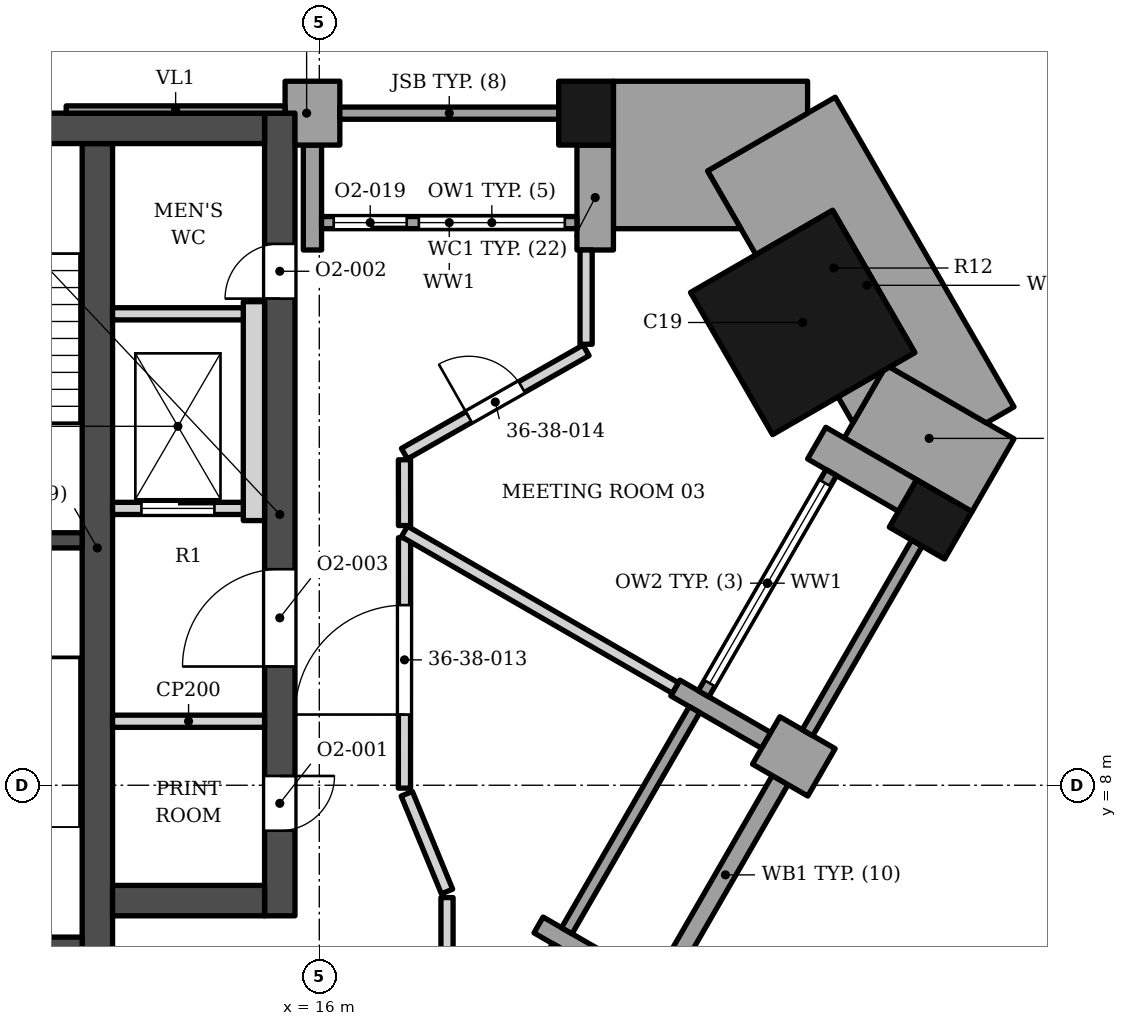
"""IFC4 building model, lengths in metres.
Left out: names, types, materials, properties, quantities, classifications, styles, units other than length and angle.
Written with IfcOpenShell. Run it as: python <this file> out.ifc"""

import sys

from ifc_helpers import new_model, si_unit, direction, frame, frame_2d, origin, origin_2d, place, context, subcontext, project, spatial, polyline, rectangle, outline, extrude, element, fill, save


model = new_model("IFC4")
c1 = context("Model", 3, precision=1e-05, world=origin(), true_north=direction((0.0, 1.0)))
c2 = subcontext(c1, "Body", "Model", "MODEL_VIEW")
j1 = project(units=[si_unit("LENGTHUNIT", "METRE"), si_unit("PLANEANGLEUNIT", "RADIAN")], contexts=[c1])
p1 = place(None, origin())
s1 = spatial("IfcSite", under=j1, at=p1, CompositionType="ELEMENT")
p2 = place(p1, origin())
s2 = spatial("IfcBuilding", under=s1, at=p2, CompositionType="ELEMENT")
p3 = place(p2, frame((0.0, 0.0, 156.3)))
s3 = spatial("IfcBuildingStorey", under=s2, at=p3, CompositionType="ELEMENT", Elevation=156.3)
p4 = place(p3, frame((-15.1, 18.802, 0.0), z_axis=(0.0, 0.0, 1.0), x_axis=(1.0, 0.0, 0.0)))
e1 = element("IfcWall", 1, at=p4, inside=s3, PredefinedType="SHEAR", context=c2, shape_type="SweptSolid", body=[
    extrude(rectangle(XDim=30.2, YDim=0.5, at=frame_2d((15.1, 0.0))), origin(), (0.0, 0.0, 1.0), 3.9),
])
p5 = place(p3, frame((12.35, 5.253, 0.0), z_axis=(0.0, 0.0, 1.0), x_axis=(0.0, 1.0, 0.0)))
e2 = element("IfcWall", 2, at=p5, inside=s3, PredefinedType="SHEAR", context=c2, shape_type="SweptSolid", body=[
    extrude(rectangle(XDim=13.3, YDim=0.5, at=frame_2d((6.65, 0.0))), origin(), (0.0, 0.0, 1.0), 3.9),
])
for number, where, z_axis, x_axis in (
    (3, (8.35, 12.028, 0.0), (0.0, 0.0, 1.0), (1.0, 0.0, 0.0)),
    (4, (8.35, 5.378, 0.0), (0.0, 0.0, 1.0), (1.0, 0.0, 0.0)),
):
    element("IfcWall", number, at=place(p3, frame(where, z_axis=z_axis, x_axis=x_axis)), inside=s3, PredefinedType="SHEAR", context=c2, shape_type="SweptSolid", body=[
        extrude(rectangle(XDim=3.75, YDim=0.25, at=frame_2d((1.875, 0.0))), origin(), (0.0, 0.0, 1.0), 3.9),
    ])
p6 = place(p3, frame((12.6, 6.103, 0.0), z_axis=(0.0, 0.0, 1.0), x_axis=(1.0, 0.0, 0.0)))
e5 = element("IfcWall", 5, at=p6, inside=s3, PredefinedType="SHEAR", context=c2, shape_type="SweptSolid", body=[
    extrude(rectangle(XDim=2.5, YDim=0.5, at=frame_2d((1.25, 0.0))), origin(), (0.0, 0.0, 1.0), 3.9),
])
p7 = place(p3, frame((15.35, 5.853, 0.0), z_axis=(0.0, 0.0, 1.0), x_axis=(0.0, 1.0, 0.0)))
e6 = element("IfcWall", 6, at=p7, inside=s3, PredefinedType="SHEAR", context=c2, shape_type="SweptSolid", body=[
    extrude(rectangle(XDim=13.2, YDim=0.5, at=frame_2d((6.6, 0.0))), origin(), (0.0, 0.0, 1.0), 3.9),
])
p8 = place(p7, frame((4.1, 0.0, 0.0)))
e7 = element("IfcOpeningElement", 7, at=p8, cuts=e6, PredefinedType="OPENING", context=c2, shape_type="SweptSolid", body=[
    extrude(rectangle(XDim=1.6, YDim=2.1, at=frame_2d((0.8, 1.05))), frame((0.0, 0.26, 0.0), z_axis=(0.0, -1.0, 0.0), x_axis=(1.0, 0.0, 0.0)), (0.0, 0.0, 1.0), 0.52),
])
p9 = place(p7, frame((1.4, 0.0, 0.0)))
e8 = element("IfcOpeningElement", 8, at=p9, cuts=e6, PredefinedType="OPENING", context=c2, shape_type="SweptSolid", body=[
    extrude(rectangle(XDim=0.9, YDim=2.1, at=frame_2d((0.45, 1.05))), frame((0.0, 0.26, 0.0), z_axis=(0.0, -1.0, 0.0), x_axis=(1.0, 0.0, 0.0)), (0.0, 0.0, 1.0), 0.52),
])
p10 = place(p7, frame((10.15, 0.0, 0.0)))
e9 = element("IfcOpeningElement", 9, at=p10, cuts=e6, PredefinedType="OPENING", context=c2, shape_type="SweptSolid", body=[
    extrude(rectangle(XDim=0.9, YDim=2.1, at=frame_2d((0.45, 1.05))), frame((0.0, 0.26, 0.0), z_axis=(0.0, -1.0, 0.0), x_axis=(1.0, 0.0, 0.0)), (0.0, 0.0, 1.0), 0.52),
])
p11 = place(p3, frame((23.949, 15.61, 0.0), z_axis=(0.0, 0.0, 1.0), x_axis=(-0.866025386331, -0.50000003023, 0.0)))
e10 = element("IfcColumn", 10, at=p11, inside=s3, PredefinedType="COLUMN", context=c2, shape_type="SweptSolid", body=[
    extrude(rectangle(XDim=2.7, YDim=2.7, at=origin_2d()), origin(), (0.0, 0.0, 1.0), 3.9),
])
for number, where, z_axis, x_axis in (
    (11, (26.054, 12.372, 0.0), (0.0, 0.0, 1.0), (0.5, 0.866, 0.0)),
    (12, (20.387, 19.053, 0.0), (0.0, 0.0, 1.0), (-1.0, 0.0, 0.0)),
):
    element("IfcColumn", number, at=place(p3, frame(where, z_axis=z_axis, x_axis=x_axis)), inside=s3, PredefinedType="COLUMN", context=c2, shape_type="SweptSolid", body=[
        extrude(rectangle(XDim=0.9, YDim=1.05, at=origin_2d()), origin(), (0.0, 0.0, 1.0), 3.9),
    ])
p12 = place(p3, frame((21.1, 4.84, 0.0), z_axis=(0.0, 0.0, 1.0), x_axis=(-0.866013532718, 0.500020560727, 0.0)))
e13 = element("IfcWall", 13, at=p12, inside=s3, PredefinedType="SOLIDWALL", context=c2, shape_type="SweptSolid", body=[
    extrude(rectangle(XDim=1.725, YDim=0.3, at=frame_2d((0.863, 0.0))), origin(), (0.0, 0.0, 1.0), 2.95),
])
p13 = place(p3, frame((24.259, 8.212, 0.0), z_axis=(0.0, 0.0, 1.0), x_axis=(-0.86592997719, 0.500165247297, 0.0)))
e14 = element("IfcWall", 14, at=p13, inside=s3, PredefinedType="SOLIDWALL", context=c2, shape_type="SweptSolid", body=[
    extrude(rectangle(XDim=1.05, YDim=0.9, at=frame_2d((0.525, 0.0))), origin(), (0.0, 0.0, 1.0), 3.0),
])
p14 = place(p3, frame((23.35, 8.737, 0.0), z_axis=(0.0, 0.0, 1.0), x_axis=(-0.866013532718, 0.500020560727, 0.0)))
e15 = element("IfcWall", 15, at=p14, inside=s3, PredefinedType="SOLIDWALL", context=c2, shape_type="SweptSolid", body=[
    extrude(rectangle(XDim=1.725, YDim=0.3, at=frame_2d((0.863, 0.0))), origin(), (0.0, 0.0, 1.0), 3.0),
])
p15 = place(p3, frame((25.674, 12.764, 0.0), z_axis=(0.0, 0.0, 1.0), x_axis=(-0.866039436866, 0.499975693202, 0.0)))
e16 = element("IfcWall", 16, at=p15, inside=s3, PredefinedType="SOLIDWALL", context=c2, shape_type="SweptSolid", body=[
    extrude(rectangle(XDim=1.725, YDim=0.6, at=frame_2d((0.862, 0.0))), origin(), (0.0, 0.0, 1.0), 3.0),
])
p16 = place(p3, frame((17.82, 1.71, 0.0), z_axis=(0.0, 0.0, 1.0), x_axis=(0.500027713859, 0.866009402589, 0.0)))
e17 = element("IfcWall", 17, at=p16, inside=s3, PredefinedType="ELEMENTEDWALL", context=c2, shape_type="SweptSolid", body=[
    extrude(rectangle(XDim=4.2, YDim=0.2, at=frame_2d((2.1, 0.0))), origin(), (0.0, 0.0, 1.0), 2.95),
])
p17 = place(p3, frame((21.779, 4.967, 0.0), z_axis=(0.0, 0.0, 1.0), x_axis=(0.500012057535, 0.866018442252, 0.0)))
e18 = element("IfcWall", 18, at=p17, inside=s3, PredefinedType="SOLIDWALL", context=c2, shape_type="SweptSolid", body=[
    extrude(rectangle(XDim=3.6, YDim=0.3, at=frame_2d((1.8, 0.0))), origin(), (0.0, 0.0, 1.0), 3.0),
])
p18 = place(p3, frame((20.07, 5.607, 0.0), z_axis=(0.0, 0.0, 1.0), x_axis=(0.500002543286, 0.866023935413, 0.0)))
e19 = element("IfcWall", 19, at=p18, inside=s3, PredefinedType="ELEMENTEDWALL", context=c2, shape_type="SweptSolid", body=[
    extrude(rectangle(XDim=4.2, YDim=0.2, at=frame_2d((2.1, 0.0))), origin(), (0.0, 0.0, 1.0), 3.0),
])
p19 = place(p3, frame((24.029, 8.864, 0.0), z_axis=(0.0, 0.0, 1.0), x_axis=(0.500012057535, 0.866018442252, 0.0)))
e20 = element("IfcWall", 20, at=p19, inside=s3, PredefinedType="SOLIDWALL", context=c2, shape_type="SweptSolid", body=[
    extrude(rectangle(XDim=3.6, YDim=0.2, at=frame_2d((1.8, 0.0))), origin(), (0.0, 0.0, 1.0), 3.0),
])
p20 = place(p3, frame((22.32, 9.504, 0.0), z_axis=(0.0, 0.0, 1.0), x_axis=(0.500027713859, 0.866009402589, 0.0)))
e21 = element("IfcWall", 21, at=p20, inside=s3, PredefinedType="ELEMENTEDWALL", context=c2, shape_type="SweptSolid", body=[
    extrude(rectangle(XDim=4.2, YDim=0.2, at=frame_2d((2.1, 0.0))), origin(), (0.0, 0.0, 1.0), 3.0),
])
p21 = place(p20, frame((0.2, 0.0, 0.45)))
e22 = element("IfcOpeningElement", 22, at=p21, cuts=e21, PredefinedType="OPENING", context=c2, shape_type="SweptSolid", body=[
    extrude(rectangle(XDim=3.8, YDim=2.25, at=frame_2d((1.9, 1.125))), frame((0.0, 0.11, 0.0), z_axis=(0.0, -1.0, 0.0), x_axis=(1.0, 0.0, 0.0)), (0.0, 0.0, 1.0), 0.22),
])
p22 = place(p3, origin())
e23 = element("IfcWall", 23, at=p22, inside=s3, PredefinedType="SOLIDWALL", context=c2, shape_type="SweptSolid", body=[
    extrude(outline(polyline([(20.837, 16.802), (20.837, 18.528), (20.238, 18.528), (20.238, 16.802), (20.837, 16.802)])), origin(), (0.0, 0.0, 1.0), 3.0),
])
p23 = place(p3, origin())
e24 = element("IfcWall", 24, at=p23, inside=s3, PredefinedType="SOLIDWALL", context=c2, shape_type="SweptSolid", body=[
    extrude(outline(polyline([(16.337, 18.528), (16.337, 19.578), (15.438, 19.578), (15.438, 19.052), (15.6, 19.052), (15.6, 18.528), (16.337, 18.528)])), origin(), (0.0, 0.0, 1.0), 3.0),
])
p24 = place(p3, origin())
e25 = element("IfcWall", 25, at=p24, inside=s3, PredefinedType="SOLIDWALL", context=c2, shape_type="SweptSolid", body=[
    extrude(outline(polyline([(15.738, 18.528), (15.738, 16.802), (16.037, 16.802), (16.037, 18.528), (15.738, 18.528)])), origin(), (0.0, 0.0, 1.0), 3.0),
])
p25 = place(p3, frame((19.938, 19.052, 0.0), z_axis=(0.0, 0.0, 1.0), x_axis=(-1.0, 0.0, 0.0)))
e26 = element("IfcWall", 26, at=p25, inside=s3, PredefinedType="SOLIDWALL", context=c2, shape_type="SweptSolid", body=[
    extrude(rectangle(XDim=3.6, YDim=0.2, at=frame_2d((1.8, 0.0))), origin(), (0.0, 0.0, 1.0), 3.0),
])
p26 = place(p3, frame((20.238, 17.252, 0.0), z_axis=(0.0, 0.0, 1.0), x_axis=(-1.0, 0.0, 0.0)))
e27 = element("IfcWall", 27, at=p26, inside=s3, PredefinedType="ELEMENTEDWALL", context=c2, shape_type="SweptSolid", body=[
    extrude(rectangle(XDim=4.2, YDim=0.2, at=frame_2d((2.1, 0.0))), origin(), (0.0, 0.0, 1.0), 3.0),
])
p27 = place(p26, frame((0.2, 0.0, 0.45)))
e28 = element("IfcOpeningElement", 28, at=p27, cuts=e27, PredefinedType="OPENING", context=c2, shape_type="SweptSolid", body=[
    extrude(rectangle(XDim=2.4, YDim=2.25, at=frame_2d((1.2, 1.125))), frame((0.0, 0.11, 0.0), z_axis=(0.0, -1.0, 0.0), x_axis=(1.0, 0.0, 0.0)), (0.0, 0.0, 1.0), 0.22),
])
p28 = place(p26, frame((2.8, 0.0, 0.0)))
e29 = element("IfcOpeningElement", 29, at=p28, cuts=e27, PredefinedType="OPENING", context=c2, shape_type="SweptSolid", body=[
    extrude(rectangle(XDim=1.2, YDim=2.7, at=frame_2d((0.6, 1.35))), frame((0.0, 0.11, 0.0), z_axis=(0.0, -1.0, 0.0), x_axis=(1.0, 0.0, 0.0)), (0.0, 0.0, 1.0), 0.22),
])
p29 = place(p3, origin())
e30 = element("IfcWall", 30, at=p29, inside=s3, PredefinedType="ELEMENTEDWALL", context=c2, shape_type="SweptSolid", body=[
    extrude(outline(polyline([(11.837, 19.173), (11.837, 19.052), (15.437, 19.052), (15.437, 19.173), (11.837, 19.173)])), origin(), (0.0, 0.0, 1.0), 3.0),
])
p30 = place(p3, frame((27.08, 13.098, 0.0), z_axis=(0.0, 0.0, 1.0), x_axis=(-0.866041403502, 0.499972286653, 0.0)))
e31 = element("IfcWall", 31, at=p30, inside=s3, PredefinedType="SOLIDWALL", context=c2, shape_type="SweptSolid", body=[
    extrude(rectangle(XDim=2.425, YDim=1.384, at=frame_2d((1.212, 0.0))), origin(), (0.0, 0.0, 1.0), 3.0),
])
p31 = place(p3, origin())
e32 = element("IfcWall", 32, at=p31, inside=s3, PredefinedType="SOLIDWALL", context=c2, shape_type="SweptSolid", body=[
    extrude(outline(polyline([(24.53, 14.387), (24.777, 13.959), (25.271, 14.814), (24.53, 14.387)])), origin(), (0.0, 0.0, 1.0), 3.0),
])
p32 = place(p3, origin())
e33 = element("IfcWall", 33, at=p32, inside=s3, PredefinedType="SOLIDWALL", context=c2, shape_type="SweptSolid", body=[
    extrude(outline(polyline([(23.18, 16.725), (24.443, 17.454), (25.793, 15.116), (25.381, 14.878), (26.971, 13.959), (27.426, 14.222), (24.485, 19.315), (22.385, 18.103), (23.18, 16.725)])), origin(), (0.0, 0.0, 1.0), 3.0),
])
p33 = place(p3, origin())
e34 = element("IfcWall", 34, at=p33, inside=s3, PredefinedType="SOLIDWALL", context=c2, shape_type="SweptSolid", body=[
    extrude(outline(polyline([(20.837, 19.578), (20.837, 17.153), (22.934, 17.153), (22.385, 18.103), (24.031, 19.052), (24.031, 19.578), (20.837, 19.578)])), origin(), (0.0, 0.0, 1.0), 3.0),
])
p34 = place(p3, frame((12.6, 9.052, 0.0), z_axis=(0.0, 0.0, 1.0), x_axis=(1.0, 0.0, 0.0)))
e35 = element("IfcWall", 35, at=p34, inside=s3, PredefinedType="PARTITIONING", context=c2, shape_type="SweptSolid", body=[
    extrude(rectangle(XDim=2.5, YDim=0.2, at=frame_2d((1.25, 0.0))), origin(), (0.0, 0.0, 1.0), 3.73),
])
p35 = place(p3, frame((14.925, 12.353, 0.0), z_axis=(0.0, 0.0, 1.0), x_axis=(0.0, 1.0, 0.0)))
e36 = element("IfcWall", 36, at=p35, inside=s3, PredefinedType="SOLIDWALL", context=c2, shape_type="SweptSolid", body=[
    extrude(rectangle(XDim=3.6, YDim=0.35, at=frame_2d((1.8, 0.0))), origin(), (0.0, 0.0, 1.0), 3.73),
])
p36 = place(p3, frame((12.6, 12.552, 0.0), z_axis=(0.0, 0.0, 1.0), x_axis=(1.0, 0.0, 0.0)))
e37 = element("IfcWall", 37, at=p36, inside=s3, PredefinedType="SOLIDWALL", context=c2, shape_type="SweptSolid", body=[
    extrude(rectangle(XDim=2.15, YDim=0.2, at=frame_2d((1.075, 0.0))), origin(), (0.0, 0.0, 1.0), 3.73),
])
p37 = place(p36, frame((0.475, 0.0, 0.0)))
e38 = element("IfcOpeningElement", 38, at=p37, cuts=e37, PredefinedType="OPENING", context=c2, shape_type="SweptSolid", body=[
    extrude(rectangle(XDim=1.2, YDim=2.1, at=frame_2d((0.6, 1.05))), frame((0.0, 0.11, 0.0), z_axis=(0.0, -1.0, 0.0), x_axis=(1.0, 0.0, 0.0)), (0.0, 0.0, 1.0), 0.22),
])
p38 = place(p3, frame((12.6, 15.753, 0.0), z_axis=(0.0, 0.0, 1.0), x_axis=(1.0, 0.0, 0.0)))
e39 = element("IfcWall", 39, at=p38, inside=s3, PredefinedType="SOLIDWALL", context=c2, shape_type="SweptSolid", body=[
    extrude(rectangle(XDim=2.15, YDim=0.2, at=frame_2d((1.075, 0.0))), origin(), (0.0, 0.0, 1.0), 3.73),
])
p39 = place(p3, frame((18.101, 4.794, 0.0), z_axis=(0.0, 0.0, 1.0), x_axis=(0.0, 1.0, 0.0)))
e40 = element("IfcWall", 40, at=p39, inside=s3, PredefinedType="PARTITIONING", context=c2, shape_type="SweptSolid", body=[
    extrude(rectangle(XDim=1.358, YDim=0.2, at=frame_2d((0.679, 0.0))), origin(), (0.0, 0.0, 1.0), 2.95),
])
p40 = place(p3, frame((17.439, 7.86, 0.0), z_axis=(0.0, 0.0, 1.0), x_axis=(0.380742741509, -0.924681007044, 0.0)))
e41 = element("IfcWall", 41, at=p40, inside=s3, PredefinedType="PARTITIONING", context=c2, shape_type="SweptSolid", body=[
    extrude(rectangle(XDim=1.738, YDim=0.2, at=frame_2d((0.869, 0.0))), origin(), (0.0, 0.0, 1.0), 3.73),
])
p41 = place(p3, frame((17.4, 7.953, 0.0), z_axis=(0.0, 0.0, 1.0), x_axis=(0.000414986922, 0.999999913893, 0.0)))
e42 = element("IfcWall", 42, at=p41, inside=s3, PredefinedType="PARTITIONING", context=c2, shape_type="SweptSolid", body=[
    extrude(rectangle(XDim=4.118, YDim=0.2, at=frame_2d((2.059, 0.0))), origin(), (0.0, 0.0, 1.0), 3.73),
])
p42 = place(p41, frame((1.209, 0.0, 0.0)))
e43 = element("IfcOpeningElement", 43, at=p42, cuts=e42, PredefinedType="OPENING", context=c2, shape_type="SweptSolid", body=[
    extrude(rectangle(XDim=1.8, YDim=2.4, at=frame_2d((0.9, 1.2))), frame((0.0, 0.11, 0.0), z_axis=(0.0, -1.0, 0.0), x_axis=(1.0, 0.0, 0.0)), (0.0, 0.0, 1.0), 0.22),
])
p43 = place(p3, frame((17.401, 12.174, 0.0), z_axis=(0.0, 0.0, 1.0), x_axis=(0.865871011045, -0.500267320772, 0.0)))
e44 = element("IfcWall", 44, at=p43, inside=s3, PredefinedType="PARTITIONING", context=c2, shape_type="SweptSolid", body=[
    extrude(rectangle(XDim=5.145, YDim=0.2, at=frame_2d((2.573, 0.0))), origin(), (0.0, 0.0, 1.0), 3.73),
])
p44 = place(p3, frame((17.401, 13.352, 0.0), z_axis=(0.0, 0.0, 1.0), x_axis=(0.001128922288, -0.999999362767, 0.0)))
e45 = element("IfcWall", 45, at=p44, inside=s3, PredefinedType="PARTITIONING", context=c2, shape_type="SweptSolid", body=[
    extrude(rectangle(XDim=1.081, YDim=0.2, at=frame_2d((0.541, 0.0))), origin(), (0.0, 0.0, 1.0), 3.73),
])
p45 = place(p3, frame((17.4, 13.452, 0.0), z_axis=(0.0, 0.0, 1.0), x_axis=(0.86915962074, 0.494531650833, 0.0)))
e46 = element("IfcWall", 46, at=p45, inside=s3, PredefinedType="PARTITIONING", context=c2, shape_type="SweptSolid", body=[
    extrude(rectangle(XDim=3.437, YDim=0.2, at=frame_2d((1.719, 0.0))), origin(), (0.0, 0.0, 1.0), 3.73),
])
p46 = place(p45, frame((1.219, 0.0, 0.0)))
e47 = element("IfcOpeningElement", 47, at=p46, cuts=e46, PredefinedType="OPENING", context=c2, shape_type="SweptSolid", body=[
    extrude(rectangle(XDim=1.0, YDim=2.1, at=frame_2d((0.5, 1.05))), frame((0.0, 0.11, 0.0), z_axis=(0.0, -1.0, 0.0), x_axis=(1.0, 0.0, 0.0)), (0.0, 0.0, 1.0), 0.22),
])
p47 = place(p3, frame((20.388, 15.252, 0.0), z_axis=(0.0, 0.0, 1.0), x_axis=(0.000157480313, 0.9999999876, 0.0)))
e48 = element("IfcWall", 48, at=p47, inside=s3, PredefinedType="PARTITIONING", context=c2, shape_type="SweptSolid", body=[
    extrude(rectangle(XDim=1.55, YDim=0.2, at=frame_2d((0.775, 0.0))), origin(), (0.0, 0.0, 1.0), 3.73),
])
p48 = place(p21, origin())
e49 = element("IfcWindow", 49, at=p48, inside=s3, PartitioningType="SINGLE_PANEL", PredefinedType="WINDOW", context=c2, shape_type="SweptSolid", body=[
    extrude(rectangle(XDim=3.8, YDim=2.25, at=frame_2d((1.9, 1.125))), frame((0.0, 0.03, 0.0), z_axis=(0.0, -1.0, 0.0), x_axis=(1.0, 0.0, 0.0)), (0.0, 0.0, 1.0), 0.06),
])
fill(e22, e49)
p49 = place(p27, origin())
e50 = element("IfcWindow", 50, at=p49, inside=s3, PartitioningType="SINGLE_PANEL", PredefinedType="WINDOW", context=c2, shape_type="SweptSolid", body=[
    extrude(rectangle(XDim=2.4, YDim=2.25, at=frame_2d((1.2, 1.125))), frame((0.0, 0.03, 0.0), z_axis=(0.0, -1.0, 0.0), x_axis=(1.0, 0.0, 0.0)), (0.0, 0.0, 1.0), 0.06),
])
fill(e28, e50)
p50 = place(p28, origin())
e51 = element("IfcDoor", 51, at=p50, inside=s3, OperationType="SINGLE_SWING_LEFT", PredefinedType="DOOR", context=c2, shape_type="SweptSolid", body=[
    extrude(rectangle(XDim=1.2, YDim=2.7, at=frame_2d((0.6, 1.35))), frame((0.0, 0.025, 0.0), z_axis=(0.0, -1.0, 0.0), x_axis=(1.0, 0.0, 0.0)), (0.0, 0.0, 1.0), 0.05),
])
fill(e29, e51)
p51 = place(p37, origin())
e52 = element("IfcDoor", 52, at=p51, inside=s3, OperationType="DOUBLE_DOOR_SLIDING", PredefinedType="DOOR", context=c2, shape_type="SweptSolid", body=[
    extrude(rectangle(XDim=1.2, YDim=2.1, at=frame_2d((0.6, 1.05))), frame((0.0, 0.025, 0.0), z_axis=(0.0, -1.0, 0.0), x_axis=(1.0, 0.0, 0.0)), (0.0, 0.0, 1.0), 0.05),
])
fill(e38, e52)
p52 = place(p8, origin())
e53 = element("IfcDoor", 53, at=p52, inside=s3, OperationType="DOUBLE_DOOR_SINGLE_SWING", PredefinedType="DOOR", context=c2, shape_type="SweptSolid", body=[
    extrude(rectangle(XDim=1.6, YDim=2.1, at=frame_2d((0.8, 1.05))), frame((0.0, 0.025, 0.0), z_axis=(0.0, -1.0, 0.0), x_axis=(1.0, 0.0, 0.0)), (0.0, 0.0, 1.0), 0.05),
])
fill(e7, e53)
p53 = place(p9, origin())
e54 = element("IfcDoor", 54, at=p53, inside=s3, OperationType="SINGLE_SWING_RIGHT", PredefinedType="DOOR", context=c2, shape_type="SweptSolid", body=[
    extrude(rectangle(XDim=0.9, YDim=2.1, at=frame_2d((0.45, 1.05))), frame((0.0, 0.025, 0.0), z_axis=(0.0, -1.0, 0.0), x_axis=(1.0, 0.0, 0.0)), (0.0, 0.0, 1.0), 0.05),
])
fill(e8, e54)
p54 = place(p10, origin())
e55 = element("IfcDoor", 55, at=p54, inside=s3, OperationType="SINGLE_SWING_LEFT", PredefinedType="DOOR", context=c2, shape_type="SweptSolid", body=[
    extrude(rectangle(XDim=0.9, YDim=2.1, at=frame_2d((0.45, 1.05))), frame((0.0, 0.025, 0.0), z_axis=(0.0, -1.0, 0.0), x_axis=(1.0, 0.0, 0.0)), (0.0, 0.0, 1.0), 0.05),
])
fill(e9, e55)
p55 = place(p42, origin())
e56 = element("IfcDoor", 56, at=p55, inside=s3, OperationType="DOUBLE_DOOR_SINGLE_SWING", PredefinedType="DOOR", context=c2, shape_type="SweptSolid", body=[
    extrude(rectangle(XDim=1.8, YDim=2.4, at=frame_2d((0.9, 1.2))), frame((0.0, 0.025, 0.0), z_axis=(0.0, -1.0, 0.0), x_axis=(1.0, 0.0, 0.0)), (0.0, 0.0, 1.0), 0.05),
])
fill(e43, e56)
p56 = place(p46, origin())
e57 = element("IfcDoor", 57, at=p56, inside=s3, OperationType="SINGLE_SWING_LEFT", PredefinedType="DOOR", context=c2, shape_type="SweptSolid", body=[
    extrude(rectangle(XDim=1.0, YDim=2.1, at=frame_2d((0.5, 1.05))), frame((0.0, 0.025, 0.0), z_axis=(0.0, -1.0, 0.0), x_axis=(1.0, 0.0, 0.0)), (0.0, 0.0, 1.0), 0.05),
])
fill(e47, e57)
save(model, sys.argv[1])
